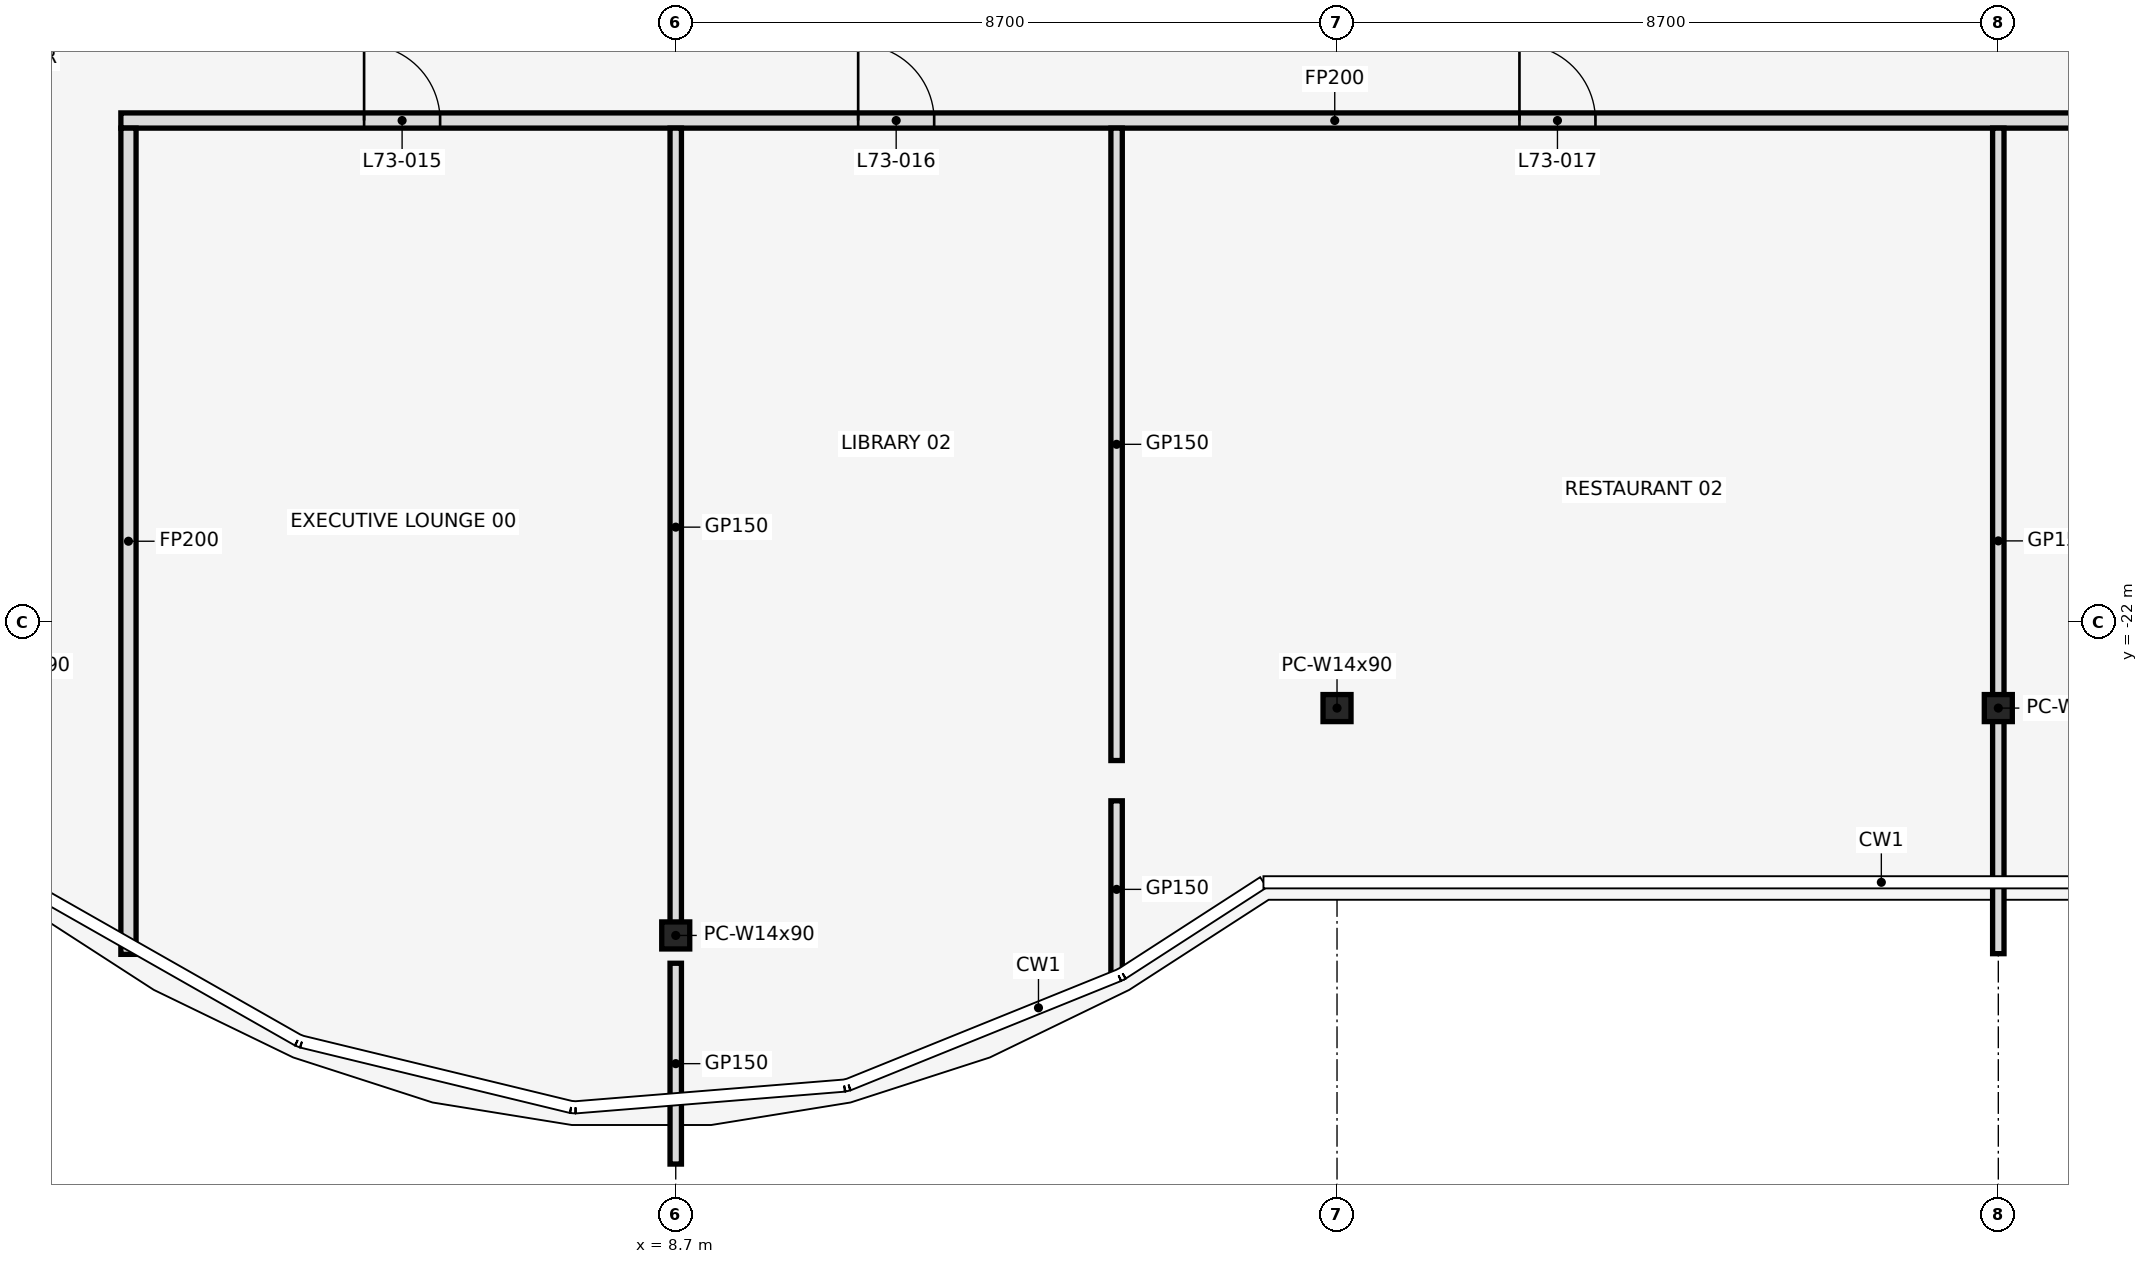
"""IFC4 building model, lengths in metres.
Left out: names, types, materials, properties, quantities, classifications, styles, units other than length and angle.
Written with IfcOpenShell. Run it as: python <this file> out.ifc"""

import sys

from ifc_helpers import new_model, si_unit, direction, frame, frame_2d, origin, origin_2d, place, context, subcontext, project, spatial, rectangle, i_section, extrude, element, fill, save


model = new_model("IFC4")
c1 = context("Model", 3, precision=1e-05, world=origin(), true_north=direction((0.0, 1.0)))
c2 = subcontext(c1, "Body", "Model", "MODEL_VIEW")
j1 = project(units=[si_unit("LENGTHUNIT", "METRE"), si_unit("PLANEANGLEUNIT", "RADIAN")], contexts=[c1])
p1 = place(None, origin())
s1 = spatial("IfcSite", under=j1, at=p1, CompositionType="ELEMENT")
p2 = place(p1, origin())
s2 = spatial("IfcBuilding", under=s1, at=p2, CompositionType="ELEMENT")
p3 = place(p2, frame((0.0, 0.0, 324.5)))
s3 = spatial("IfcBuildingStorey", under=s2, at=p3, CompositionType="ELEMENT", Elevation=324.5)
for number, where, z_axis, x_axis in (
    (1, (8.7, -26.121, 0.0), (0.0, 0.0, 1.0), (1.0, 0.0, 0.0)),
    (2, (17.4, -23.13, 0.0), (0.0, 0.0, 1.0), (1.0, 0.0, 0.0)),
    (3, (26.1, -23.13, 0.0), (0.0, 0.0, 1.0), (1.0, 0.0, 0.0)),
):
    element("IfcColumn", number, at=place(p3, frame(where, z_axis=z_axis, x_axis=x_axis)), inside=s3, PredefinedType="COLUMN", context=c2, shape_type="SweptSolid", body=[
        extrude(i_section(OverallWidth=0.368, OverallDepth=0.356, WebThickness=0.011, FlangeThickness=0.018, at=origin_2d()), origin(), (0.0, 0.0, 1.0), 4.5),
    ])
p4 = place(p3, frame((1.4, -15.4, 0.0), z_axis=(0.0, 0.0, 1.0), x_axis=(1.0, 0.0, 0.0)))
e4 = element("IfcWall", 4, at=p4, inside=s3, PredefinedType="PARTITIONING", context=c2, shape_type="SweptSolid", body=[
    extrude(rectangle(XDim=31.94, YDim=0.2, at=frame_2d((15.97, 0.0))), origin(), (0.0, 0.0, 1.0), 3.418),
])
p5 = place(p4, frame((3.2, 0.0, 0.0)))
e5 = element("IfcOpeningElement", 5, at=p5, cuts=e4, PredefinedType="OPENING", context=c2, shape_type="SweptSolid", body=[
    extrude(rectangle(XDim=1.0, YDim=2.1, at=frame_2d((0.5, 1.05))), frame((0.0, 0.112, 0.0), z_axis=(0.0, -1.0, 0.0), x_axis=(1.0, 0.0, 0.0)), (0.0, 0.0, 1.0), 0.224),
])
p6 = place(p4, frame((9.7, 0.0, 0.0)))
e6 = element("IfcOpeningElement", 6, at=p6, cuts=e4, PredefinedType="OPENING", context=c2, shape_type="SweptSolid", body=[
    extrude(rectangle(XDim=1.0, YDim=2.1, at=frame_2d((0.5, 1.05))), frame((0.0, 0.112, 0.0), z_axis=(0.0, -1.0, 0.0), x_axis=(1.0, 0.0, 0.0)), (0.0, 0.0, 1.0), 0.224),
])
p7 = place(p4, frame((18.4, 0.0, 0.0)))
e7 = element("IfcOpeningElement", 7, at=p7, cuts=e4, PredefinedType="OPENING", context=c2, shape_type="SweptSolid", body=[
    extrude(rectangle(XDim=1.0, YDim=2.1, at=frame_2d((0.5, 1.05))), frame((0.0, 0.112, 0.0), z_axis=(0.0, -1.0, 0.0), x_axis=(1.0, 0.0, 0.0)), (0.0, 0.0, 1.0), 0.224),
])
p8 = place(p4, frame((27.8, 0.0, 0.0)))
e8 = element("IfcOpeningElement", 8, at=p8, cuts=e4, PredefinedType="OPENING", context=c2, shape_type="SweptSolid", body=[
    extrude(rectangle(XDim=1.0, YDim=2.1, at=frame_2d((0.5, 1.05))), frame((0.0, 0.112, 0.0), z_axis=(0.0, -1.0, 0.0), x_axis=(1.0, 0.0, 0.0)), (0.0, 0.0, 1.0), 0.224),
])
p9 = place(p3, frame((1.5, -26.37, 0.0), z_axis=(0.0, 0.0, 1.0), x_axis=(0.0, 1.0, 0.0)))
e9 = element("IfcWall", 9, at=p9, inside=s3, PredefinedType="PARTITIONING", context=c2, shape_type="SweptSolid", body=[
    extrude(rectangle(XDim=10.87, YDim=0.2, at=frame_2d((5.435, 0.0))), origin(), (0.0, 0.0, 1.0), 3.418),
])
p10 = place(p3, frame((8.7, -29.129, 0.0), z_axis=(0.0, 0.0, 1.0), x_axis=(0.0, 1.0, 0.0)))
e10 = element("IfcWall", 10, at=p10, inside=s3, PredefinedType="PARTITIONING", context=c2, shape_type="SweptSolid", body=[
    extrude(rectangle(XDim=2.642, YDim=0.15, at=frame_2d((1.321, 0.0))), origin(), (0.0, 0.0, 1.0), 3.418),
])
p11 = place(p3, frame((8.7, -25.999, 0.0), z_axis=(0.0, 0.0, 1.0), x_axis=(0.0, 1.0, 0.0)))
e11 = element("IfcWall", 11, at=p11, inside=s3, PredefinedType="PARTITIONING", context=c2, shape_type="SweptSolid", body=[
    extrude(rectangle(XDim=10.499, YDim=0.15, at=frame_2d((5.25, 0.0))), origin(), (0.0, 0.0, 1.0), 3.418),
])
p12 = place(p3, frame((14.5, -26.68, 0.0), z_axis=(0.0, 0.0, 1.0), x_axis=(0.0, 1.0, 0.0)))
e12 = element("IfcWall", 12, at=p12, inside=s3, PredefinedType="PARTITIONING", context=c2, shape_type="SweptSolid", body=[
    extrude(rectangle(XDim=2.33, YDim=0.15, at=frame_2d((1.165, 0.0))), origin(), (0.0, 0.0, 1.0), 3.418),
])
p13 = place(p3, frame((14.5, -23.82, 0.0), z_axis=(0.0, 0.0, 1.0), x_axis=(0.0, 1.0, 0.0)))
e13 = element("IfcWall", 13, at=p13, inside=s3, PredefinedType="PARTITIONING", context=c2, shape_type="SweptSolid", body=[
    extrude(rectangle(XDim=8.32, YDim=0.15, at=frame_2d((4.16, 0.0))), origin(), (0.0, 0.0, 1.0), 3.418),
])
p14 = place(p3, frame((26.1, -26.361, 0.0), z_axis=(0.0, 0.0, 1.0), x_axis=(0.0, 1.0, 0.0)))
e14 = element("IfcWall", 14, at=p14, inside=s3, PredefinedType="PARTITIONING", context=c2, shape_type="SweptSolid", body=[
    extrude(rectangle(XDim=10.861, YDim=0.15, at=frame_2d((5.431, 0.0))), origin(), (0.0, 0.0, 1.0), 3.418),
])
p15 = place(p5, frame((1.0, 0.0, 0.0), z_axis=(0.0, 0.0, 1.0), x_axis=(-1.0, 0.0, 0.0)))
e15 = element("IfcDoor", 15, at=p15, inside=s3, OperationType="SINGLE_SWING_RIGHT", PredefinedType="DOOR", context=c2, shape_type="SweptSolid", body=[
    extrude(rectangle(XDim=1.0, YDim=2.1, at=frame_2d((0.5, 1.05))), frame((0.0, 0.025, 0.0), z_axis=(0.0, -1.0, 0.0), x_axis=(1.0, 0.0, 0.0)), (0.0, 0.0, 1.0), 0.05),
])
fill(e5, e15)
p16 = place(p6, frame((1.0, 0.0, 0.0), z_axis=(0.0, 0.0, 1.0), x_axis=(-1.0, 0.0, 0.0)))
e16 = element("IfcDoor", 16, at=p16, inside=s3, OperationType="SINGLE_SWING_LEFT", PredefinedType="DOOR", context=c2, shape_type="SweptSolid", body=[
    extrude(rectangle(XDim=1.0, YDim=2.1, at=frame_2d((0.5, 1.05))), frame((0.0, 0.025, 0.0), z_axis=(0.0, -1.0, 0.0), x_axis=(1.0, 0.0, 0.0)), (0.0, 0.0, 1.0), 0.05),
])
fill(e6, e16)
p17 = place(p7, frame((1.0, 0.0, 0.0), z_axis=(0.0, 0.0, 1.0), x_axis=(-1.0, 0.0, 0.0)))
e17 = element("IfcDoor", 17, at=p17, inside=s3, OperationType="SINGLE_SWING_RIGHT", PredefinedType="DOOR", context=c2, shape_type="SweptSolid", body=[
    extrude(rectangle(XDim=1.0, YDim=2.1, at=frame_2d((0.5, 1.05))), frame((0.0, 0.025, 0.0), z_axis=(0.0, -1.0, 0.0), x_axis=(1.0, 0.0, 0.0)), (0.0, 0.0, 1.0), 0.05),
])
fill(e7, e17)
save(model, sys.argv[1])
